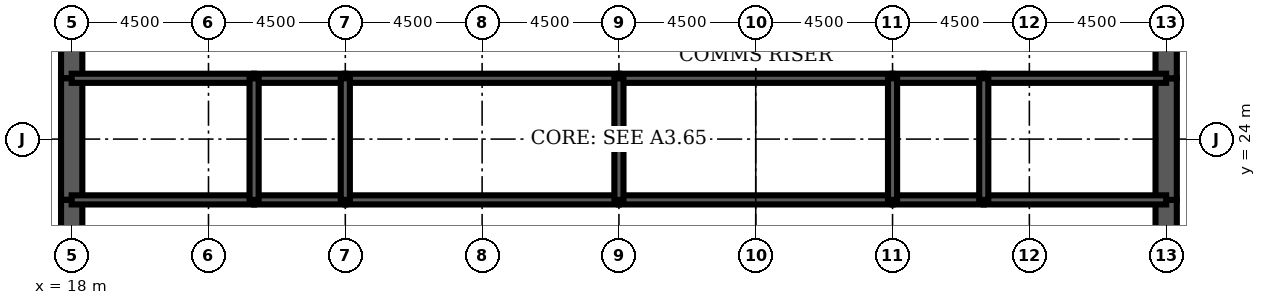
"""IFC4 building model, lengths in metres.
Left out: names, types, materials, properties, quantities, classifications, styles, units other than length and angle.
Written with IfcOpenShell. Run it as: python <this file> out.ifc"""

import sys

from ifc_helpers import new_model, si_unit, direction, frame, frame_2d, origin, place, context, subcontext, project, spatial, rectangle, extrude, element, fill, save


model = new_model("IFC4")
c1 = context("Model", 3, precision=1e-05, world=origin(), true_north=direction((0.0, 1.0)))
c2 = subcontext(c1, "Body", "Model", "MODEL_VIEW")
j1 = project(units=[si_unit("LENGTHUNIT", "METRE"), si_unit("PLANEANGLEUNIT", "RADIAN")], contexts=[c1])
p1 = place(None, origin())
s1 = spatial("IfcSite", under=j1, at=p1, CompositionType="ELEMENT")
p2 = place(p1, origin())
s2 = spatial("IfcBuilding", under=s1, at=p2, CompositionType="ELEMENT")
p3 = place(p2, frame((0.0, 0.0, 279.5)))
s3 = spatial("IfcBuildingStorey", under=s2, at=p3, CompositionType="ELEMENT", Elevation=279.5)
p4 = place(p3, frame((18.0, 28.8, 0.0), z_axis=(0.0, 0.0, 1.0), x_axis=(0.0, -1.0, 0.0)))
e1 = element("IfcWall", 1, at=p4, inside=s3, PredefinedType="SHEAR", context=c2, shape_type="SweptSolid", body=[
    extrude(rectangle(XDim=2.8, YDim=0.7, at=frame_2d((1.4, 0.0))), origin(), (0.0, 0.0, 1.0), 4.2),
])
p5 = place(p4, frame((0.4, 0.0, 0.0)))
e2 = element("IfcOpeningElement", 2, at=p5, cuts=e1, PredefinedType="OPENING", context=c2, shape_type="SweptSolid", body=[
    extrude(rectangle(XDim=1.8, YDim=2.1, at=frame_2d((0.9, 1.05))), frame((0.0, 0.36, 0.0), z_axis=(0.0, -1.0, 0.0), x_axis=(1.0, 0.0, 0.0)), (0.0, 0.0, 1.0), 0.72),
])
p6 = place(p3, frame((18.0, 26.0, 0.0), z_axis=(0.0, 0.0, 1.0), x_axis=(0.0, -1.0, 0.0)))
e3 = element("IfcWall", 3, at=p6, inside=s3, PredefinedType="SHEAR", context=c2, shape_type="SweptSolid", body=[
    extrude(rectangle(XDim=4.0, YDim=0.7, at=frame_2d((2.0, 0.0))), origin(), (0.0, 0.0, 1.0), 4.2),
])
p7 = place(p3, frame((18.0, 22.0, 0.0), z_axis=(0.0, 0.0, 1.0), x_axis=(0.0, -1.0, 0.0)))
e4 = element("IfcWall", 4, at=p7, inside=s3, PredefinedType="SHEAR", context=c2, shape_type="SweptSolid", body=[
    extrude(rectangle(XDim=2.8, YDim=0.7, at=frame_2d((1.4, 0.0))), origin(), (0.0, 0.0, 1.0), 4.2),
])
p8 = place(p7, frame((0.6, 0.0, 0.0)))
e5 = element("IfcOpeningElement", 5, at=p8, cuts=e4, PredefinedType="OPENING", context=c2, shape_type="SweptSolid", body=[
    extrude(rectangle(XDim=1.8, YDim=2.1, at=frame_2d((0.9, 1.05))), frame((0.0, 0.36, 0.0), z_axis=(0.0, -1.0, 0.0), x_axis=(1.0, 0.0, 0.0)), (0.0, 0.0, 1.0), 0.72),
])
p9 = place(p3, frame((54.0, 19.2, 0.0), z_axis=(0.0, 0.0, 1.0), x_axis=(0.0, 1.0, 0.0)))
e6 = element("IfcWall", 6, at=p9, inside=s3, PredefinedType="SHEAR", context=c2, shape_type="SweptSolid", body=[
    extrude(rectangle(XDim=2.8, YDim=0.7, at=frame_2d((1.4, 0.0))), origin(), (0.0, 0.0, 1.0), 4.2),
])
p10 = place(p9, frame((0.4, 0.0, 0.0)))
e7 = element("IfcOpeningElement", 7, at=p10, cuts=e6, PredefinedType="OPENING", context=c2, shape_type="SweptSolid", body=[
    extrude(rectangle(XDim=1.8, YDim=2.1, at=frame_2d((0.9, 1.05))), frame((0.0, 0.36, 0.0), z_axis=(0.0, -1.0, 0.0), x_axis=(1.0, 0.0, 0.0)), (0.0, 0.0, 1.0), 0.72),
])
p11 = place(p3, frame((54.0, 22.0, 0.0), z_axis=(0.0, 0.0, 1.0), x_axis=(0.0, 1.0, 0.0)))
e8 = element("IfcWall", 8, at=p11, inside=s3, PredefinedType="SHEAR", context=c2, shape_type="SweptSolid", body=[
    extrude(rectangle(XDim=4.0, YDim=0.7, at=frame_2d((2.0, 0.0))), origin(), (0.0, 0.0, 1.0), 4.2),
])
p12 = place(p3, frame((54.0, 26.0, 0.0), z_axis=(0.0, 0.0, 1.0), x_axis=(0.0, 1.0, 0.0)))
e9 = element("IfcWall", 9, at=p12, inside=s3, PredefinedType="SHEAR", context=c2, shape_type="SweptSolid", body=[
    extrude(rectangle(XDim=2.8, YDim=0.7, at=frame_2d((1.4, 0.0))), origin(), (0.0, 0.0, 1.0), 4.2),
])
p13 = place(p12, frame((0.6, 0.0, 0.0)))
e10 = element("IfcOpeningElement", 10, at=p13, cuts=e9, PredefinedType="OPENING", context=c2, shape_type="SweptSolid", body=[
    extrude(rectangle(XDim=1.8, YDim=2.1, at=frame_2d((0.9, 1.05))), frame((0.0, 0.36, 0.0), z_axis=(0.0, -1.0, 0.0), x_axis=(1.0, 0.0, 0.0)), (0.0, 0.0, 1.0), 0.72),
])
p14 = place(p3, frame((18.0, 22.0, 0.0), z_axis=(0.0, 0.0, 1.0), x_axis=(1.0, 0.0, 0.0)))
e11 = element("IfcWall", 11, at=p14, inside=s3, PredefinedType="SOLIDWALL", context=c2, shape_type="SweptSolid", body=[
    extrude(rectangle(XDim=6.0, YDim=0.3, at=frame_2d((3.0, 0.0))), origin(), (0.0, 0.0, 1.0), 4.2),
])
p15 = place(p14, frame((2.0, 0.0, 0.0)))
e12 = element("IfcOpeningElement", 12, at=p15, cuts=e11, PredefinedType="OPENING", context=c2, shape_type="SweptSolid", body=[
    extrude(rectangle(XDim=1.0, YDim=2.1, at=frame_2d((0.5, 1.05))), frame((0.0, 0.16, 0.0), z_axis=(0.0, -1.0, 0.0), x_axis=(1.0, 0.0, 0.0)), (0.0, 0.0, 1.0), 0.32),
])
p16 = place(p3, frame((24.0, 22.0, 0.0), z_axis=(0.0, 0.0, 1.0), x_axis=(1.0, 0.0, 0.0)))
e13 = element("IfcWall", 13, at=p16, inside=s3, PredefinedType="SOLIDWALL", context=c2, shape_type="SweptSolid", body=[
    extrude(rectangle(XDim=3.0, YDim=0.3, at=frame_2d((1.5, 0.0))), origin(), (0.0, 0.0, 1.0), 4.2),
])
p17 = place(p16, frame((1.0, 0.0, 0.0)))
e14 = element("IfcOpeningElement", 14, at=p17, cuts=e13, PredefinedType="OPENING", context=c2, shape_type="SweptSolid", body=[
    extrude(rectangle(XDim=1.0, YDim=2.1, at=frame_2d((0.5, 1.05))), frame((0.0, 0.16, 0.0), z_axis=(0.0, -1.0, 0.0), x_axis=(1.0, 0.0, 0.0)), (0.0, 0.0, 1.0), 0.32),
])
p18 = place(p3, frame((27.0, 22.0, 0.0), z_axis=(0.0, 0.0, 1.0), x_axis=(1.0, 0.0, 0.0)))
e15 = element("IfcWall", 15, at=p18, inside=s3, PredefinedType="SOLIDWALL", context=c2, shape_type="SweptSolid", body=[
    extrude(rectangle(XDim=9.0, YDim=0.3, at=frame_2d((4.5, 0.0))), origin(), (0.0, 0.0, 1.0), 4.2),
])
p19 = place(p18, frame((4.0, 0.0, 0.0)))
e16 = element("IfcOpeningElement", 16, at=p19, cuts=e15, PredefinedType="OPENING", context=c2, shape_type="SweptSolid", body=[
    extrude(rectangle(XDim=1.0, YDim=2.1, at=frame_2d((0.5, 1.05))), frame((0.0, 0.16, 0.0), z_axis=(0.0, -1.0, 0.0), x_axis=(1.0, 0.0, 0.0)), (0.0, 0.0, 1.0), 0.32),
])
p20 = place(p3, frame((36.0, 22.0, 0.0), z_axis=(0.0, 0.0, 1.0), x_axis=(1.0, 0.0, 0.0)))
e17 = element("IfcWall", 17, at=p20, inside=s3, PredefinedType="SOLIDWALL", context=c2, shape_type="SweptSolid", body=[
    extrude(rectangle(XDim=9.0, YDim=0.3, at=frame_2d((4.5, 0.0))), origin(), (0.0, 0.0, 1.0), 4.2),
])
p21 = place(p20, frame((4.0, 0.0, 0.0)))
e18 = element("IfcOpeningElement", 18, at=p21, cuts=e17, PredefinedType="OPENING", context=c2, shape_type="SweptSolid", body=[
    extrude(rectangle(XDim=1.0, YDim=2.1, at=frame_2d((0.5, 1.05))), frame((0.0, 0.16, 0.0), z_axis=(0.0, -1.0, 0.0), x_axis=(1.0, 0.0, 0.0)), (0.0, 0.0, 1.0), 0.32),
])
p22 = place(p3, frame((45.0, 22.0, 0.0), z_axis=(0.0, 0.0, 1.0), x_axis=(1.0, 0.0, 0.0)))
e19 = element("IfcWall", 19, at=p22, inside=s3, PredefinedType="SOLIDWALL", context=c2, shape_type="SweptSolid", body=[
    extrude(rectangle(XDim=3.0, YDim=0.3, at=frame_2d((1.5, 0.0))), origin(), (0.0, 0.0, 1.0), 4.2),
])
p23 = place(p22, frame((1.0, 0.0, 0.0)))
e20 = element("IfcOpeningElement", 20, at=p23, cuts=e19, PredefinedType="OPENING", context=c2, shape_type="SweptSolid", body=[
    extrude(rectangle(XDim=1.0, YDim=2.1, at=frame_2d((0.5, 1.05))), frame((0.0, 0.16, 0.0), z_axis=(0.0, -1.0, 0.0), x_axis=(1.0, 0.0, 0.0)), (0.0, 0.0, 1.0), 0.32),
])
p24 = place(p3, frame((48.0, 22.0, 0.0), z_axis=(0.0, 0.0, 1.0), x_axis=(1.0, 0.0, 0.0)))
e21 = element("IfcWall", 21, at=p24, inside=s3, PredefinedType="SOLIDWALL", context=c2, shape_type="SweptSolid", body=[
    extrude(rectangle(XDim=6.0, YDim=0.3, at=frame_2d((3.0, 0.0))), origin(), (0.0, 0.0, 1.0), 4.2),
])
p25 = place(p24, frame((2.0, 0.0, 0.0)))
e22 = element("IfcOpeningElement", 22, at=p25, cuts=e21, PredefinedType="OPENING", context=c2, shape_type="SweptSolid", body=[
    extrude(rectangle(XDim=1.0, YDim=2.1, at=frame_2d((0.5, 1.05))), frame((0.0, 0.16, 0.0), z_axis=(0.0, -1.0, 0.0), x_axis=(1.0, 0.0, 0.0)), (0.0, 0.0, 1.0), 0.32),
])
p26 = place(p24, frame((4.1, 0.0, 0.0)))
e23 = element("IfcOpeningElement", 23, at=p26, cuts=e21, PredefinedType="OPENING", context=c2, shape_type="SweptSolid", body=[
    extrude(rectangle(XDim=1.0, YDim=2.1, at=frame_2d((0.5, 1.05))), frame((0.0, 0.16, 0.0), z_axis=(0.0, -1.0, 0.0), x_axis=(1.0, 0.0, 0.0)), (0.0, 0.0, 1.0), 0.32),
])
p27 = place(p3, frame((18.0, 26.0, 0.0), z_axis=(0.0, 0.0, 1.0), x_axis=(1.0, 0.0, 0.0)))
e24 = element("IfcWall", 24, at=p27, inside=s3, PredefinedType="SOLIDWALL", context=c2, shape_type="SweptSolid", body=[
    extrude(rectangle(XDim=6.0, YDim=0.3, at=frame_2d((3.0, 0.0))), origin(), (0.0, 0.0, 1.0), 4.2),
])
p28 = place(p3, frame((24.0, 26.0, 0.0), z_axis=(0.0, 0.0, 1.0), x_axis=(1.0, 0.0, 0.0)))
e25 = element("IfcWall", 25, at=p28, inside=s3, PredefinedType="SOLIDWALL", context=c2, shape_type="SweptSolid", body=[
    extrude(rectangle(XDim=3.0, YDim=0.3, at=frame_2d((1.5, 0.0))), origin(), (0.0, 0.0, 1.0), 4.2),
])
for number, where, z_axis, x_axis in (
    (26, (27.0, 26.0, 0.0), (0.0, 0.0, 1.0), (1.0, 0.0, 0.0)),
    (27, (36.0, 26.0, 0.0), (0.0, 0.0, 1.0), (1.0, 0.0, 0.0)),
):
    element("IfcWall", number, at=place(p3, frame(where, z_axis=z_axis, x_axis=x_axis)), inside=s3, PredefinedType="SOLIDWALL", context=c2, shape_type="SweptSolid", body=[
        extrude(rectangle(XDim=9.0, YDim=0.3, at=frame_2d((4.5, 0.0))), origin(), (0.0, 0.0, 1.0), 4.2),
    ])
p29 = place(p3, frame((45.0, 26.0, 0.0), z_axis=(0.0, 0.0, 1.0), x_axis=(1.0, 0.0, 0.0)))
e28 = element("IfcWall", 28, at=p29, inside=s3, PredefinedType="SOLIDWALL", context=c2, shape_type="SweptSolid", body=[
    extrude(rectangle(XDim=3.0, YDim=0.3, at=frame_2d((1.5, 0.0))), origin(), (0.0, 0.0, 1.0), 4.2),
])
p30 = place(p3, frame((48.0, 26.0, 0.0), z_axis=(0.0, 0.0, 1.0), x_axis=(1.0, 0.0, 0.0)))
e29 = element("IfcWall", 29, at=p30, inside=s3, PredefinedType="SOLIDWALL", context=c2, shape_type="SweptSolid", body=[
    extrude(rectangle(XDim=6.0, YDim=0.3, at=frame_2d((3.0, 0.0))), origin(), (0.0, 0.0, 1.0), 4.2),
])
for number, where, z_axis, x_axis in (
    (30, (24.0, 22.0, 0.0), (0.0, 0.0, 1.0), (0.0, 1.0, 0.0)),
    (31, (27.0, 22.0, 0.0), (0.0, 0.0, 1.0), (0.0, 1.0, 0.0)),
    (32, (36.0, 22.0, 0.0), (0.0, 0.0, 1.0), (0.0, 1.0, 0.0)),
    (33, (45.0, 22.0, 0.0), (0.0, 0.0, 1.0), (0.0, 1.0, 0.0)),
    (34, (48.0, 22.0, 0.0), (0.0, 0.0, 1.0), (0.0, 1.0, 0.0)),
):
    element("IfcWall", number, at=place(p3, frame(where, z_axis=z_axis, x_axis=x_axis)), inside=s3, PredefinedType="SOLIDWALL", context=c2, shape_type="SweptSolid", body=[
        extrude(rectangle(XDim=4.0, YDim=0.3, at=frame_2d((2.0, 0.0))), origin(), (0.0, 0.0, 1.0), 4.2),
    ])
p31 = place(p3, frame((42.5, 22.15, 0.0), z_axis=(0.0, 0.0, 1.0), x_axis=(0.0, 1.0, 0.0)))
e35 = element("IfcWall", 35, at=p31, inside=s3, PredefinedType="PARTITIONING", context=c2, shape_type="SweptSolid", body=[
    extrude(rectangle(XDim=3.7, YDim=0.15, at=frame_2d((1.85, 0.0))), origin(), (0.0, 0.0, 1.0), 3.0),
])
p32 = place(p31, frame((2.2, 0.0, 0.0)))
e36 = element("IfcOpeningElement", 36, at=p32, cuts=e35, PredefinedType="OPENING", context=c2, shape_type="SweptSolid", body=[
    extrude(rectangle(XDim=1.0, YDim=2.1, at=frame_2d((0.5, 1.05))), frame((0.0, 0.085, 0.0), z_axis=(0.0, -1.0, 0.0), x_axis=(1.0, 0.0, 0.0)), (0.0, 0.0, 1.0), 0.17),
])
p33 = place(p3, frame((51.475, 22.15, 0.0), z_axis=(0.0, 0.0, 1.0), x_axis=(0.0, 1.0, 0.0)))
e37 = element("IfcWall", 37, at=p33, inside=s3, PredefinedType="PARTITIONING", context=c2, shape_type="SweptSolid", body=[
    extrude(rectangle(XDim=3.7, YDim=0.15, at=frame_2d((1.85, 0.0))), origin(), (0.0, 0.0, 1.0), 3.0),
])
p34 = place(p3, frame((22.2, 26.15, 0.0), z_axis=(0.0, 0.0, 1.0), x_axis=(0.0, 1.0, 0.0)))
e38 = element("IfcWall", 38, at=p34, inside=s3, PredefinedType="PARTITIONING", context=c2, shape_type="SweptSolid", body=[
    extrude(rectangle(XDim=2.5, YDim=0.15, at=frame_2d((1.25, 0.0))), origin(), (0.0, 0.0, 1.0), 3.0),
])
p35 = place(p34, frame((0.35, 0.0, 0.0)))
e39 = element("IfcOpeningElement", 39, at=p35, cuts=e38, PredefinedType="OPENING", context=c2, shape_type="SweptSolid", body=[
    extrude(rectangle(XDim=1.0, YDim=2.1, at=frame_2d((0.5, 1.05))), frame((0.0, 0.085, 0.0), z_axis=(0.0, -1.0, 0.0), x_axis=(1.0, 0.0, 0.0)), (0.0, 0.0, 1.0), 0.17),
])
p36 = place(p32, origin())
e40 = element("IfcDoor", 40, at=p36, inside=s3, OperationType="SINGLE_SWING_RIGHT", PredefinedType="DOOR", context=c2, shape_type="SweptSolid", body=[
    extrude(rectangle(XDim=1.0, YDim=2.1, at=frame_2d((0.5, 1.05))), frame((0.0, 0.025, 0.0), z_axis=(0.0, -1.0, 0.0), x_axis=(1.0, 0.0, 0.0)), (0.0, 0.0, 1.0), 0.05),
])
fill(e36, e40)
p37 = place(p35, origin())
e41 = element("IfcDoor", 41, at=p37, inside=s3, OperationType="SINGLE_SWING_LEFT", PredefinedType="DOOR", context=c2, shape_type="SweptSolid", body=[
    extrude(rectangle(XDim=1.0, YDim=2.1, at=frame_2d((0.5, 1.05))), frame((0.0, 0.025, 0.0), z_axis=(0.0, -1.0, 0.0), x_axis=(1.0, 0.0, 0.0)), (0.0, 0.0, 1.0), 0.05),
])
fill(e39, e41)
p38 = place(p8, origin())
e42 = element("IfcDoor", 42, at=p38, inside=s3, OperationType="SINGLE_SWING_LEFT", PredefinedType="DOOR", context=c2, shape_type="SweptSolid", body=[
    extrude(rectangle(XDim=1.8, YDim=2.1, at=frame_2d((0.9, 1.05))), frame((0.0, 0.35, 0.0), z_axis=(0.0, -1.0, 0.0), x_axis=(1.0, 0.0, 0.0)), (0.0, 0.0, 1.0), 0.699),
])
fill(e5, e42)
p39 = place(p5, origin())
e43 = element("IfcDoor", 43, at=p39, inside=s3, OperationType="SINGLE_SWING_LEFT", PredefinedType="DOOR", context=c2, shape_type="SweptSolid", body=[
    extrude(rectangle(XDim=1.8, YDim=2.1, at=frame_2d((0.9, 1.05))), frame((0.0, 0.35, 0.0), z_axis=(0.0, -1.0, 0.0), x_axis=(1.0, 0.0, 0.0)), (0.0, 0.0, 1.0), 0.699),
])
fill(e2, e43)
p40 = place(p10, origin())
e44 = element("IfcDoor", 44, at=p40, inside=s3, OperationType="SINGLE_SWING_LEFT", PredefinedType="DOOR", context=c2, shape_type="SweptSolid", body=[
    extrude(rectangle(XDim=1.8, YDim=2.1, at=frame_2d((0.9, 1.05))), frame((0.0, 0.35, 0.0), z_axis=(0.0, -1.0, 0.0), x_axis=(1.0, 0.0, 0.0)), (0.0, 0.0, 1.0), 0.699),
])
fill(e7, e44)
p41 = place(p13, origin())
e45 = element("IfcDoor", 45, at=p41, inside=s3, OperationType="SINGLE_SWING_LEFT", PredefinedType="DOOR", context=c2, shape_type="SweptSolid", body=[
    extrude(rectangle(XDim=1.8, YDim=2.1, at=frame_2d((0.9, 1.05))), frame((0.0, 0.35, 0.0), z_axis=(0.0, -1.0, 0.0), x_axis=(1.0, 0.0, 0.0)), (0.0, 0.0, 1.0), 0.699),
])
fill(e10, e45)
p42 = place(p15, origin())
e46 = element("IfcDoor", 46, at=p42, inside=s3, OperationType="SINGLE_SWING_LEFT", PredefinedType="DOOR", context=c2, shape_type="SweptSolid", body=[
    extrude(rectangle(XDim=1.0, YDim=2.1, at=frame_2d((0.5, 1.05))), frame((0.0, 0.025, 0.0), z_axis=(0.0, -1.0, 0.0), x_axis=(1.0, 0.0, 0.0)), (0.0, 0.0, 1.0), 0.05),
])
fill(e12, e46)
p43 = place(p17, origin())
e47 = element("IfcDoor", 47, at=p43, inside=s3, OperationType="SINGLE_SWING_LEFT", PredefinedType="DOOR", context=c2, shape_type="SweptSolid", body=[
    extrude(rectangle(XDim=1.0, YDim=2.1, at=frame_2d((0.5, 1.05))), frame((0.0, 0.025, 0.0), z_axis=(0.0, -1.0, 0.0), x_axis=(1.0, 0.0, 0.0)), (0.0, 0.0, 1.0), 0.05),
])
fill(e14, e47)
p44 = place(p19, origin())
e48 = element("IfcDoor", 48, at=p44, inside=s3, OperationType="SINGLE_SWING_LEFT", PredefinedType="DOOR", context=c2, shape_type="SweptSolid", body=[
    extrude(rectangle(XDim=1.0, YDim=2.1, at=frame_2d((0.5, 1.05))), frame((0.0, 0.025, 0.0), z_axis=(0.0, -1.0, 0.0), x_axis=(1.0, 0.0, 0.0)), (0.0, 0.0, 1.0), 0.05),
])
fill(e16, e48)
p45 = place(p21, origin())
e49 = element("IfcDoor", 49, at=p45, inside=s3, OperationType="SINGLE_SWING_LEFT", PredefinedType="DOOR", context=c2, shape_type="SweptSolid", body=[
    extrude(rectangle(XDim=1.0, YDim=2.1, at=frame_2d((0.5, 1.05))), frame((0.0, 0.025, 0.0), z_axis=(0.0, -1.0, 0.0), x_axis=(1.0, 0.0, 0.0)), (0.0, 0.0, 1.0), 0.05),
])
fill(e18, e49)
p46 = place(p23, origin())
e50 = element("IfcDoor", 50, at=p46, inside=s3, OperationType="SINGLE_SWING_LEFT", PredefinedType="DOOR", context=c2, shape_type="SweptSolid", body=[
    extrude(rectangle(XDim=1.0, YDim=2.1, at=frame_2d((0.5, 1.05))), frame((0.0, 0.025, 0.0), z_axis=(0.0, -1.0, 0.0), x_axis=(1.0, 0.0, 0.0)), (0.0, 0.0, 1.0), 0.05),
])
fill(e20, e50)
p47 = place(p25, origin())
e51 = element("IfcDoor", 51, at=p47, inside=s3, OperationType="SINGLE_SWING_LEFT", PredefinedType="DOOR", context=c2, shape_type="SweptSolid", body=[
    extrude(rectangle(XDim=1.0, YDim=2.1, at=frame_2d((0.5, 1.05))), frame((0.0, 0.025, 0.0), z_axis=(0.0, -1.0, 0.0), x_axis=(1.0, 0.0, 0.0)), (0.0, 0.0, 1.0), 0.05),
])
fill(e22, e51)
p48 = place(p26, origin())
e52 = element("IfcDoor", 52, at=p48, inside=s3, OperationType="SINGLE_SWING_RIGHT", PredefinedType="DOOR", context=c2, shape_type="SweptSolid", body=[
    extrude(rectangle(XDim=1.0, YDim=2.1, at=frame_2d((0.5, 1.05))), frame((0.0, 0.025, 0.0), z_axis=(0.0, -1.0, 0.0), x_axis=(1.0, 0.0, 0.0)), (0.0, 0.0, 1.0), 0.05),
])
fill(e23, e52)
save(model, sys.argv[1])
